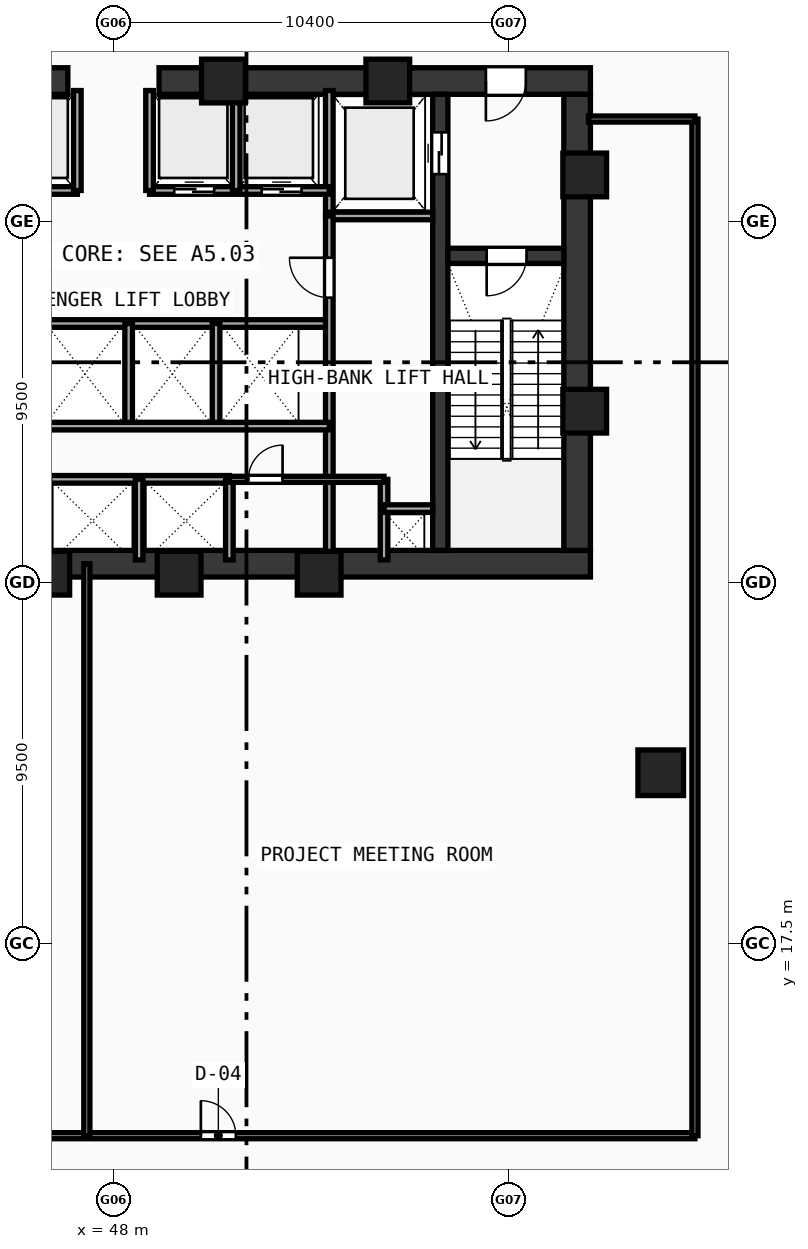
"""IFC4 building model, lengths in metres.
Left out: names, types, materials, properties, quantities, classifications, styles, units other than length and angle.
Written with IfcOpenShell. Run it as: python <this file> out.ifc"""

import sys

from ifc_helpers import new_model, si_unit, direction, frame, frame_2d, origin, origin_with_axes, origin_2d, place, context, subcontext, project, spatial, rectangle, hollow_rectangle, extrude, source, transform, mapped, element, fill, save


model = new_model("IFC4")
c1 = context("Model", 3, precision=1e-05, world=origin(), true_north=direction((0.0, 1.0)))
c2 = subcontext(c1, "Body", "Model", "MODEL_VIEW")
j1 = project(units=[si_unit("LENGTHUNIT", "METRE"), si_unit("PLANEANGLEUNIT", "RADIAN")], contexts=[c1])
p1 = place(None, origin())
s1 = spatial("IfcSite", under=j1, at=p1, CompositionType="ELEMENT")
p2 = place(p1, origin())
s2 = spatial("IfcBuilding", under=s1, at=p2, CompositionType="ELEMENT")
p3 = place(p2, frame((0.0, 0.0, 14.4)))
s3 = spatial("IfcBuildingStorey", under=s2, at=p3, CompositionType="ELEMENT", Elevation=14.4)
p4 = place(p3, frame((35.45, 27.5, 0.0), z_axis=(0.0, 0.0, 1.0), x_axis=(1.0, 0.0, 0.0)))
e1 = element("IfcWall", 1, at=p4, inside=s3, PredefinedType="SHEAR", context=c2, shape_type="SweptSolid", body=[
    extrude(rectangle(XDim=25.1, YDim=0.7, at=frame_2d((12.55, 0.0))), origin(), (0.0, 0.0, 1.0), 4.52),
])
p5 = place(p3, frame((35.45, 40.2, 0.0), z_axis=(0.0, 0.0, 1.0), x_axis=(1.0, 0.0, 0.0)))
e2 = element("IfcWall", 2, at=p5, inside=s3, PredefinedType="SHEAR", context=c2, shape_type="SweptSolid", body=[
    extrude(rectangle(XDim=11.35, YDim=0.7, at=frame_2d((5.675, 0.0))), origin(), (0.0, 0.0, 1.0), 4.52),
])
p6 = place(p5, frame((1.7, 0.0, 0.0)))
e3 = element("IfcOpeningElement", 3, at=p6, cuts=e2, PredefinedType="OPENING", context=c2, shape_type="SweptSolid", body=[
    extrude(rectangle(XDim=1.05, YDim=2.1, at=frame_2d((0.525, 1.05))), frame((0.0, 0.36, 0.0), z_axis=(0.0, -1.0, 0.0), x_axis=(1.0, 0.0, 0.0)), (0.0, 0.0, 1.0), 0.72),
])
p7 = place(p3, frame((49.2, 40.2, 0.0), z_axis=(0.0, 0.0, 1.0), x_axis=(1.0, 0.0, 0.0)))
e4 = element("IfcWall", 4, at=p7, inside=s3, PredefinedType="SHEAR", context=c2, shape_type="SweptSolid", body=[
    extrude(rectangle(XDim=11.35, YDim=0.7, at=frame_2d((5.675, 0.0))), origin(), (0.0, 0.0, 1.0), 4.52),
])
p8 = place(p7, frame((8.6, 0.0, 0.0)))
e5 = element("IfcOpeningElement", 5, at=p8, cuts=e4, PredefinedType="OPENING", context=c2, shape_type="SweptSolid", body=[
    extrude(rectangle(XDim=1.05, YDim=2.1, at=frame_2d((0.525, 1.05))), frame((0.0, 0.36, 0.0), z_axis=(0.0, -1.0, 0.0), x_axis=(1.0, 0.0, 0.0)), (0.0, 0.0, 1.0), 0.72),
])
p9 = place(p3, frame((60.2, 27.85, 0.0), z_axis=(0.0, 0.0, 1.0), x_axis=(0.0, 1.0, 0.0)))
e6 = element("IfcWall", 6, at=p9, inside=s3, PredefinedType="SHEAR", context=c2, shape_type="SweptSolid", body=[
    extrude(rectangle(XDim=12.0, YDim=0.7, at=frame_2d((6.0, 0.0))), origin(), (0.0, 0.0, 1.0), 4.52),
])
p10 = place(p3, frame((56.6, 27.85, 0.0), z_axis=(0.0, 0.0, 1.0), x_axis=(0.0, 1.0, 0.0)))
e7 = element("IfcWall", 7, at=p10, inside=s3, PredefinedType="SHEAR", context=c2, shape_type="SweptSolid", body=[
    extrude(rectangle(XDim=12.0, YDim=0.4, at=frame_2d((6.0, 0.0))), origin(), (0.0, 0.0, 1.0), 4.52),
])
p11 = place(p10, frame((9.9, 0.0, 0.0)))
e8 = element("IfcOpeningElement", 8, at=p11, cuts=e7, PredefinedType="OPENING", context=c2, shape_type="SweptSolid", body=[
    extrude(rectangle(XDim=1.1, YDim=2.1, at=frame_2d((0.55, 1.05))), frame((0.0, 0.21, 0.0), z_axis=(0.0, -1.0, 0.0), x_axis=(1.0, 0.0, 0.0)), (0.0, 0.0, 1.0), 0.42),
])
p12 = place(p3, frame((56.8, 35.6, 0.0), z_axis=(0.0, 0.0, 1.0), x_axis=(1.0, 0.0, 0.0)))
e9 = element("IfcWall", 9, at=p12, inside=s3, PredefinedType="SHEAR", context=c2, shape_type="SweptSolid", body=[
    extrude(rectangle(XDim=3.05, YDim=0.4, at=frame_2d((1.525, 0.0))), origin(), (0.0, 0.0, 1.0), 4.52),
])
p13 = place(p12, frame((1.02, 0.0, 0.0)))
e10 = element("IfcOpeningElement", 10, at=p13, cuts=e9, PredefinedType="OPENING", context=c2, shape_type="SweptSolid", body=[
    extrude(rectangle(XDim=1.05, YDim=2.1, at=frame_2d((0.525, 1.05))), frame((0.0, 0.21, 0.0), z_axis=(0.0, -1.0, 0.0), x_axis=(1.0, 0.0, 0.0)), (0.0, 0.0, 1.0), 0.42),
])
m1 = source(origin(), c2, "Body", "SweptSolid", [
    extrude(hollow_rectangle(XDim=1.15, YDim=1.15, WallThickness=0.048, at=origin_2d()), origin(), (0.0, 0.0, 1.0), 4.8),
])
for number, where, z_axis, x_axis in (
    (11, (46.272, 27.25, -0.28), (0.0, 0.0, 1.0), (1.0, 0.0, 0.0)),
    (12, (49.729, 27.25, -0.28), (0.0, 0.0, 1.0), (1.0, 0.0, 0.0)),
    (13, (53.412, 27.25, -0.28), (0.0, 0.0, 1.0), (1.0, 0.0, 0.0)),
    (14, (60.4, 31.513, -0.28), (0.0, 0.0, 1.0), (1.0, 0.0, 0.0)),
    (15, (60.4, 37.729, -0.28), (0.0, 0.0, 1.0), (1.0, 0.0, 0.0)),
    (16, (55.219, 40.2, -0.28), (0.0, 0.0, 1.0), (1.0, 0.0, 0.0)),
    (17, (50.894, 40.2, -0.28), (0.0, 0.0, 1.0), (1.0, 0.0, 0.0)),
):
    element("IfcColumn", number, at=place(p3, frame(where, z_axis=z_axis, x_axis=x_axis)), inside=s3, PredefinedType="COLUMN", context=c2, shape_type="MappedRepresentation", body=[
        mapped(m1, transform((0.0, 0.0, 0.0), scale=1.0)),
    ])
m2 = source(origin(), c2, "Body", "SweptSolid", [
    extrude(hollow_rectangle(XDim=1.2, YDim=1.2, WallThickness=0.05, at=origin_2d()), origin(), (0.0, 0.0, 1.0), 4.8),
])
p14 = place(p3, frame((62.4, 22.0, -0.28), z_axis=(0.0, 0.0, 1.0), x_axis=(1.0, 0.0, 0.0)))
e18 = element("IfcColumn", 18, at=p14, inside=s3, PredefinedType="COLUMN", context=c2, shape_type="MappedRepresentation", body=[
    mapped(m2, transform((0.0, 0.0, 0.0), scale=1.0)),
])
p15 = place(p3, frame((53.68, 36.65, 0.0), z_axis=(0.0, 0.0, 1.0), x_axis=(0.0, 1.0, 0.0)))
e19 = element("IfcWall", 19, at=p15, inside=s3, PredefinedType="SOLIDWALL", context=c2, shape_type="SweptSolid", body=[
    extrude(rectangle(XDim=3.3, YDim=0.2, at=frame_2d((1.65, 0.0))), origin(), (0.0, 0.0, 1.0), 4.52),
])
p16 = place(p3, frame((53.68, 36.65, 0.0), z_axis=(0.0, 0.0, 1.0), x_axis=(1.0, 0.0, 0.0)))
e20 = element("IfcWall", 20, at=p16, inside=s3, PredefinedType="SOLIDWALL", context=c2, shape_type="SweptSolid", body=[
    extrude(rectangle(XDim=2.72, YDim=0.2, at=frame_2d((1.36, 0.0))), origin(), (0.0, 0.0, 1.0), 4.52),
])
p17 = place(p3, frame((42.32, 37.32, 0.0), z_axis=(0.0, 0.0, 1.0), x_axis=(1.0, 0.0, 0.0)))
e21 = element("IfcWall", 21, at=p17, inside=s3, PredefinedType="SOLIDWALL", context=c2, shape_type="SweptSolid", body=[
    extrude(rectangle(XDim=4.73, YDim=0.2, at=frame_2d((2.365, 0.0))), origin(), (0.0, 0.0, 1.0), 4.52),
])
p18 = place(p17, frame((0.65, 0.0, 0.0)))
e22 = element("IfcOpeningElement", 22, at=p18, cuts=e21, PredefinedType="OPENING", context=c2, shape_type="SweptSolid", body=[
    extrude(rectangle(XDim=1.05, YDim=2.1, at=frame_2d((0.525, 1.05))), frame((0.0, 0.11, 0.0), z_axis=(0.0, -1.0, 0.0), x_axis=(1.0, 0.0, 0.0)), (0.0, 0.0, 1.0), 0.22),
])
p19 = place(p17, frame((2.95, 0.0, 0.0)))
e23 = element("IfcOpeningElement", 23, at=p19, cuts=e21, PredefinedType="OPENING", context=c2, shape_type="SweptSolid", body=[
    extrude(rectangle(XDim=1.05, YDim=2.1, at=frame_2d((0.525, 1.05))), frame((0.0, 0.11, 0.0), z_axis=(0.0, -1.0, 0.0), x_axis=(1.0, 0.0, 0.0)), (0.0, 0.0, 1.0), 0.22),
])
p20 = place(p3, frame((48.95, 37.32, 0.0), z_axis=(0.0, 0.0, 1.0), x_axis=(1.0, 0.0, 0.0)))
e24 = element("IfcWall", 24, at=p20, inside=s3, PredefinedType="SOLIDWALL", context=c2, shape_type="SweptSolid", body=[
    extrude(rectangle(XDim=4.73, YDim=0.2, at=frame_2d((2.365, 0.0))), origin(), (0.0, 0.0, 1.0), 4.52),
])
p21 = place(p20, frame((0.65, 0.0, 0.0)))
e25 = element("IfcOpeningElement", 25, at=p21, cuts=e24, PredefinedType="OPENING", context=c2, shape_type="SweptSolid", body=[
    extrude(rectangle(XDim=1.05, YDim=2.1, at=frame_2d((0.525, 1.05))), frame((0.0, 0.11, 0.0), z_axis=(0.0, -1.0, 0.0), x_axis=(1.0, 0.0, 0.0)), (0.0, 0.0, 1.0), 0.22),
])
p22 = place(p20, frame((2.95, 0.0, 0.0)))
e26 = element("IfcOpeningElement", 26, at=p22, cuts=e24, PredefinedType="OPENING", context=c2, shape_type="SweptSolid", body=[
    extrude(rectangle(XDim=1.05, YDim=2.1, at=frame_2d((0.525, 1.05))), frame((0.0, 0.11, 0.0), z_axis=(0.0, -1.0, 0.0), x_axis=(1.0, 0.0, 0.0)), (0.0, 0.0, 1.0), 0.22),
])
for number, where, z_axis, x_axis in (
    (27, (47.05, 37.32, 0.0), (0.0, 0.0, 1.0), (0.0, 1.0, 0.0)),
    (28, (48.95, 37.32, 0.0), (0.0, 0.0, 1.0), (0.0, 1.0, 0.0)),
    (29, (51.23, 37.32, 0.0), (0.0, 0.0, 1.0), (0.0, 1.0, 0.0)),
):
    element("IfcWall", number, at=place(p3, frame(where, z_axis=z_axis, x_axis=x_axis)), inside=s3, PredefinedType="SOLIDWALL", context=c2, shape_type="SweptSolid", body=[
        extrude(rectangle(XDim=2.63, YDim=0.2, at=frame_2d((1.315, 0.0))), origin(), (0.0, 0.0, 1.0), 4.52),
    ])
p23 = place(p3, frame((43.85, 33.82, 0.0), z_axis=(0.0, 0.0, 1.0), x_axis=(1.0, 0.0, 0.0)))
e30 = element("IfcWall", 30, at=p23, inside=s3, PredefinedType="SOLIDWALL", context=c2, shape_type="SweptSolid", body=[
    extrude(rectangle(XDim=9.83, YDim=0.2, at=frame_2d((4.915, 0.0))), origin(), (0.0, 0.0, 1.0), 4.52),
])
p24 = place(p3, frame((53.68, 27.6, 0.0), z_axis=(0.0, 0.0, 1.0), x_axis=(0.0, 1.0, 0.0)))
e31 = element("IfcWall", 31, at=p24, inside=s3, PredefinedType="SOLIDWALL", context=c2, shape_type="SweptSolid", body=[
    extrude(rectangle(XDim=9.05, YDim=0.2, at=frame_2d((4.525, 0.0))), origin(), (0.0, 0.0, 1.0), 4.52),
])
p25 = place(p24, frame((6.9, 0.0, 0.0)))
e32 = element("IfcOpeningElement", 32, at=p25, cuts=e31, PredefinedType="OPENING", context=c2, shape_type="SweptSolid", body=[
    extrude(rectangle(XDim=1.05, YDim=2.1, at=frame_2d((0.525, 1.05))), frame((0.0, 0.11, 0.0), z_axis=(0.0, -1.0, 0.0), x_axis=(1.0, 0.0, 0.0)), (0.0, 0.0, 1.0), 0.22),
])
for number, where, z_axis, x_axis in (
    (33, (48.4, 31.12, 0.0), (0.0, 0.0, 1.0), (0.0, 1.0, 0.0)),
    (34, (50.7, 31.12, 0.0), (0.0, 0.0, 1.0), (0.0, 1.0, 0.0)),
):
    element("IfcWall", number, at=place(p3, frame(where, z_axis=z_axis, x_axis=x_axis)), inside=s3, PredefinedType="SOLIDWALL", context=c2, shape_type="SweptSolid", body=[
        extrude(rectangle(XDim=2.7, YDim=0.2, at=frame_2d((1.35, 0.0))), origin(), (0.0, 0.0, 1.0), 4.52),
    ])
p26 = place(p3, frame((43.85, 29.72, 0.0), z_axis=(0.0, 0.0, 1.0), x_axis=(1.0, 0.0, 0.0)))
e35 = element("IfcWall", 35, at=p26, inside=s3, PredefinedType="SOLIDWALL", context=c2, shape_type="SweptSolid", body=[
    extrude(rectangle(XDim=7.2, YDim=0.2, at=frame_2d((3.6, 0.0))), origin(), (0.0, 0.0, 1.0), 4.52),
])
p27 = place(p3, frame((51.05, 27.6, 0.0), z_axis=(0.0, 0.0, 1.0), x_axis=(0.0, 1.0, 0.0)))
e36 = element("IfcWall", 36, at=p27, inside=s3, PredefinedType="SOLIDWALL", context=c2, shape_type="SweptSolid", body=[
    extrude(rectangle(XDim=2.12, YDim=0.2, at=frame_2d((1.06, 0.0))), origin(), (0.0, 0.0, 1.0), 4.52),
])
p28 = place(p3, frame((43.85, 31.12, 0.0), z_axis=(0.0, 0.0, 1.0), x_axis=(1.0, 0.0, 0.0)))
e37 = element("IfcWall", 37, at=p28, inside=s3, PredefinedType="SOLIDWALL", context=c2, shape_type="SweptSolid", body=[
    extrude(rectangle(XDim=9.83, YDim=0.2, at=frame_2d((4.915, 0.0))), origin(), (0.0, 0.0, 1.0), 4.52),
])
for number, where, z_axis, x_axis in (
    (38, (48.675, 27.6, 0.0), (0.0, 0.0, 1.0), (0.0, 1.0, 0.0)),
    (39, (55.12, 27.6, 0.0), (0.0, 0.0, 1.0), (0.0, 1.0, 0.0)),
):
    element("IfcWall", number, at=place(p3, frame(where, z_axis=z_axis, x_axis=x_axis)), inside=s3, PredefinedType="SOLIDWALL", context=c2, shape_type="SweptSolid", body=[
        extrude(rectangle(XDim=2.12, YDim=0.2, at=frame_2d((1.06, 0.0))), origin(), (0.0, 0.0, 1.0), 4.52),
    ])
p29 = place(p3, frame((55.12, 28.95, 0.0), z_axis=(0.0, 0.0, 1.0), x_axis=(1.0, 0.0, 0.0)))
e40 = element("IfcWall", 40, at=p29, inside=s3, PredefinedType="SOLIDWALL", context=c2, shape_type="SweptSolid", body=[
    extrude(rectangle(XDim=1.28, YDim=0.2, at=frame_2d((0.64, 0.0))), origin(), (0.0, 0.0, 1.0), 4.52),
])
p30 = place(p3, frame((51.05, 29.72, 0.0), z_axis=(0.0, 0.0, 1.0), x_axis=(1.0, 0.0, 0.0)))
e41 = element("IfcWall", 41, at=p30, inside=s3, PredefinedType="PARTITIONING", context=c2, shape_type="SweptSolid", body=[
    extrude(rectangle(XDim=4.07, YDim=0.16, at=frame_2d((2.035, 0.0))), origin(), (0.0, 0.0, 1.0), 4.52),
])
p31 = place(p30, frame((0.5, 0.0, 0.0)))
e42 = element("IfcOpeningElement", 42, at=p31, cuts=e41, PredefinedType="OPENING", context=c2, shape_type="SweptSolid", body=[
    extrude(rectangle(XDim=0.9, YDim=2.1, at=frame_2d((0.45, 1.05))), frame((0.0, 0.09, 0.0), z_axis=(0.0, -1.0, 0.0), x_axis=(1.0, 0.0, 0.0)), (0.0, 0.0, 1.0), 0.18),
])
p32 = place(p3, frame((32.7, 12.45, 0.0), z_axis=(0.0, 0.0, 1.0), x_axis=(1.0, 0.0, 0.0)))
e43 = element("IfcWall", 43, at=p32, inside=s3, PredefinedType="PARTITIONING", context=c2, shape_type="SweptSolid", body=[
    extrude(rectangle(XDim=30.6, YDim=0.16, at=frame_2d((15.3, 0.0))), origin(), (0.0, 0.0, 1.0), 3.62),
])
p33 = place(p32, frame((17.6, 0.0, 0.0)))
e44 = element("IfcOpeningElement", 44, at=p33, cuts=e43, PredefinedType="OPENING", context=c2, shape_type="SweptSolid", body=[
    extrude(rectangle(XDim=0.92, YDim=2.1, at=frame_2d((0.46, 1.05))), frame((0.0, 0.09, 0.0), z_axis=(0.0, -1.0, 0.0), x_axis=(1.0, 0.0, 0.0)), (0.0, 0.0, 1.0), 0.18),
])
p34 = place(p32, frame((5.9, 0.0, 0.0)))
e45 = element("IfcOpeningElement", 45, at=p34, cuts=e43, PredefinedType="OPENING", context=c2, shape_type="SweptSolid", body=[
    extrude(rectangle(XDim=0.94, YDim=2.1, at=frame_2d((0.47, 1.05))), frame((0.0, 0.09, 0.0), z_axis=(0.0, -1.0, 0.0), x_axis=(1.0, 0.0, 0.0)), (0.0, 0.0, 1.0), 0.18),
])
p35 = place(p3, frame((63.3, 12.45, 0.0), z_axis=(0.0, 0.0, 1.0), x_axis=(0.0, 1.0, 0.0)))
e46 = element("IfcWall", 46, at=p35, inside=s3, PredefinedType="PARTITIONING", context=c2, shape_type="SweptSolid", body=[
    extrude(rectangle(XDim=26.75, YDim=0.16, at=frame_2d((13.375, 0.0))), origin(), (0.0, 0.0, 1.0), 3.62),
])
p36 = place(p3, frame((60.5, 39.2, 0.0), z_axis=(0.0, 0.0, 1.0), x_axis=(1.0, 0.0, 0.0)))
e47 = element("IfcWall", 47, at=p36, inside=s3, PredefinedType="PARTITIONING", context=c2, shape_type="SweptSolid", body=[
    extrude(rectangle(XDim=2.8, YDim=0.16, at=frame_2d((1.4, 0.0))), origin(), (0.0, 0.0, 1.0), 3.62),
])
p37 = place(p3, frame((47.3, 12.45, 0.0), z_axis=(0.0, 0.0, 1.0), x_axis=(0.0, 1.0, 0.0)))
e48 = element("IfcWall", 48, at=p37, inside=s3, PredefinedType="PARTITIONING", context=c2, shape_type="SweptSolid", body=[
    extrude(rectangle(XDim=15.05, YDim=0.16, at=frame_2d((7.525, 0.0))), origin(), (0.0, 0.0, 1.0), 3.62),
])
p38 = place(p3, frame((45.0, 34.4, 0.0), z_axis=(0.0, 0.0, 1.0), x_axis=(1.0, 0.0, 0.0)))
e49 = element("IfcWall", 49, at=p38, inside=s3, PredefinedType="MOVABLE", context=c2, shape_type="SweptSolid", body=[
    extrude(rectangle(XDim=6.0, YDim=0.11, at=frame_2d((3.0, 0.0))), origin(), (0.0, 0.0, 1.0), 2.5),
])
m3 = source(origin(), c2, "Body", "SweptSolid", [
    extrude(rectangle(XDim=1.05, YDim=2.1, at=frame_2d((0.525, 1.05))), frame((0.0, 0.025, 0.0), z_axis=(0.0, -1.0, 0.0), x_axis=(1.0, 0.0, 0.0)), (0.0, 0.0, 1.0), 0.05),
])
p39 = place(p13, frame((1.05, 0.0, 0.0), z_axis=(0.0, 0.0, 1.0), x_axis=(-1.0, 0.0, 0.0)))
e50 = element("IfcDoor", 50, at=p39, inside=s3, OperationType="SINGLE_SWING_RIGHT", PredefinedType="DOOR", context=c2, shape_type="MappedRepresentation", body=[
    mapped(m3, transform((0.0, 0.0, 0.0), scale=1.0)),
])
fill(e10, e50)
p40 = place(p8, frame((1.05, 0.0, 0.0), z_axis=(0.0, 0.0, 1.0), x_axis=(-1.0, 0.0, 0.0)))
e51 = element("IfcDoor", 51, at=p40, inside=s3, OperationType="SINGLE_SWING_RIGHT", PredefinedType="DOOR", context=c2, shape_type="MappedRepresentation", body=[
    mapped(m3, transform((0.0, 0.0, 0.0), scale=1.0)),
])
fill(e5, e51)
m4 = source(origin(), c2, "Body", "SweptSolid", [
    extrude(rectangle(XDim=1.1, YDim=2.1, at=frame_2d((0.55, 1.05))), frame((0.0, 0.025, 0.0), z_axis=(0.0, -1.0, 0.0), x_axis=(1.0, 0.0, 0.0)), (0.0, 0.0, 1.0), 0.05),
])
p41 = place(p11, origin_with_axes())
e52 = element("IfcDoor", 52, at=p41, inside=s3, OperationType="DOUBLE_DOOR_SLIDING", PredefinedType="DOOR", context=c2, shape_type="MappedRepresentation", body=[
    mapped(m4, transform((0.0, 0.0, 0.0), scale=1.0)),
])
fill(e8, e52)
p42 = place(p21, frame((1.05, 0.0, 0.0), z_axis=(0.0, 0.0, 1.0), x_axis=(-1.0, 0.0, 0.0)))
e53 = element("IfcDoor", 53, at=p42, inside=s3, OperationType="DOUBLE_DOOR_SLIDING", PredefinedType="DOOR", context=c2, shape_type="MappedRepresentation", body=[
    mapped(m3, transform((0.0, 0.0, 0.0), scale=1.0)),
])
fill(e25, e53)
p43 = place(p22, frame((1.05, 0.0, 0.0), z_axis=(0.0, 0.0, 1.0), x_axis=(-1.0, 0.0, 0.0)))
e54 = element("IfcDoor", 54, at=p43, inside=s3, OperationType="DOUBLE_DOOR_SLIDING", PredefinedType="DOOR", context=c2, shape_type="MappedRepresentation", body=[
    mapped(m3, transform((0.0, 0.0, 0.0), scale=1.0)),
])
fill(e26, e54)
p44 = place(p25, origin_with_axes())
e55 = element("IfcDoor", 55, at=p44, inside=s3, OperationType="SINGLE_SWING_RIGHT", PredefinedType="DOOR", context=c2, shape_type="MappedRepresentation", body=[
    mapped(m3, transform((0.0, 0.0, 0.0), scale=1.0)),
])
fill(e32, e55)
m5 = source(origin(), c2, "Body", "SweptSolid", [
    extrude(rectangle(XDim=0.9, YDim=2.1, at=frame_2d((0.45, 1.05))), frame((0.0, 0.025, 0.0), z_axis=(0.0, -1.0, 0.0), x_axis=(1.0, 0.0, 0.0)), (0.0, 0.0, 1.0), 0.05),
])
p45 = place(p31, origin_with_axes())
e56 = element("IfcDoor", 56, at=p45, inside=s3, OperationType="SINGLE_SWING_RIGHT", PredefinedType="DOOR", context=c2, shape_type="MappedRepresentation", body=[
    mapped(m5, transform((0.0, 0.0, 0.0), scale=1.0)),
])
fill(e42, e56)
m6 = source(origin(), c2, "Body", "SweptSolid", [
    extrude(rectangle(XDim=0.92, YDim=2.1, at=frame_2d((0.46, 1.05))), frame((0.0, 0.025, 0.0), z_axis=(0.0, -1.0, 0.0), x_axis=(1.0, 0.0, 0.0)), (0.0, 0.0, 1.0), 0.05),
])
p46 = place(p33, origin_with_axes())
e57 = element("IfcDoor", 57, at=p46, inside=s3, OperationType="SINGLE_SWING_LEFT", PredefinedType="DOOR", context=c2, shape_type="MappedRepresentation", body=[
    mapped(m6, transform((0.0, 0.0, 0.0), scale=1.0)),
])
fill(e44, e57)
save(model, sys.argv[1])
